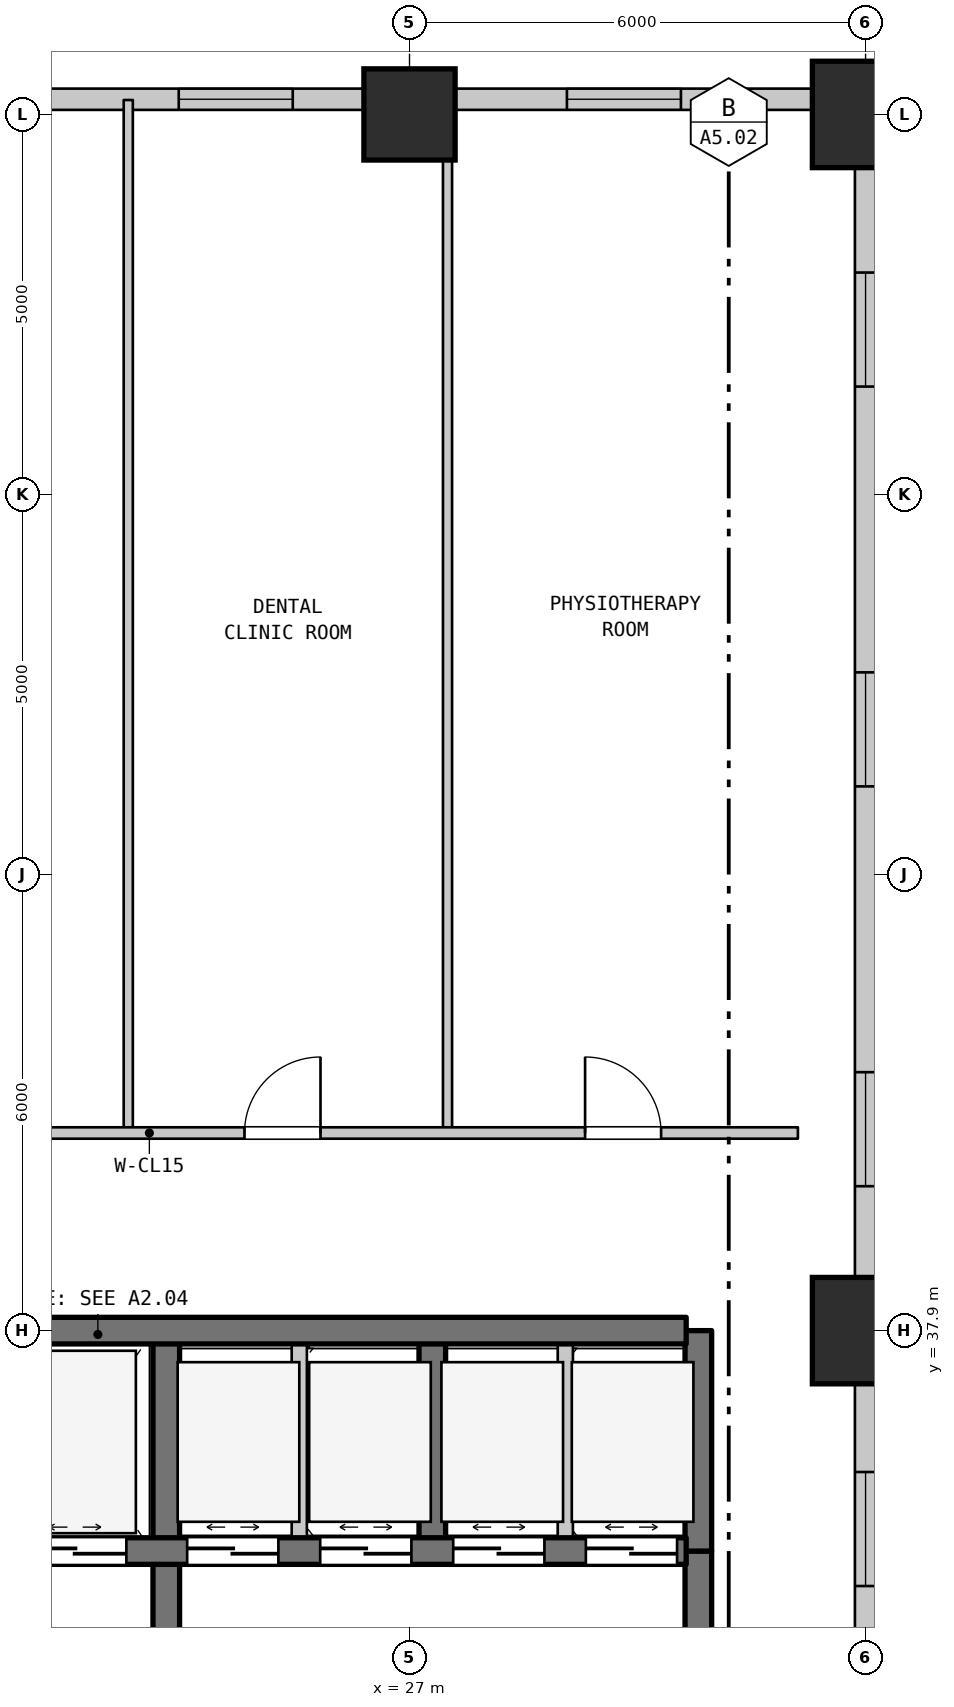
"""IFC4 building model, lengths in metres.
Left out: names, types, materials, properties, quantities, classifications, styles, units other than length and angle.
Written with IfcOpenShell. Run it as: python <this file> out.ifc"""

import sys

from ifc_helpers import new_model, si_unit, direction, frame, frame_2d, origin, origin_2d, place, context, subcontext, project, spatial, rectangle, extrude, element, fill, save


model = new_model("IFC4")
c1 = context("Model", 3, precision=1e-05, world=origin(), true_north=direction((0.0, 1.0)))
c2 = subcontext(c1, "Body", "Model", "MODEL_VIEW")
j1 = project(units=[si_unit("LENGTHUNIT", "METRE"), si_unit("PLANEANGLEUNIT", "RADIAN")], contexts=[c1])
p1 = place(None, origin())
s1 = spatial("IfcSite", under=j1, at=p1, CompositionType="ELEMENT")
p2 = place(p1, origin())
s2 = spatial("IfcBuilding", under=s1, at=p2, CompositionType="ELEMENT")
p3 = place(p2, frame((0.0, 0.0, 13.0)))
s3 = spatial("IfcBuildingStorey", under=s2, at=p3, CompositionType="ELEMENT", Elevation=13.0)
p4 = place(p3, frame((27.0, 53.9, 0.0), z_axis=(0.0, 0.0, 1.0), x_axis=(1.0, 0.0, 0.0)))
e1 = element("IfcColumn", 1, at=p4, inside=s3, PredefinedType="PILASTER", context=c2, shape_type="SweptSolid", body=[
    extrude(rectangle(XDim=1.2, YDim=1.2, at=origin_2d()), origin(), (0.0, 0.0, 1.0), 6.0),
])
for number, where, z_axis, x_axis in (
    (2, (33.0, 37.9, 0.0), (0.0, 0.0, 1.0), (1.0, 0.0, 0.0)),
    (3, (33.0, 53.9, 0.0), (0.0, 0.0, 1.0), (1.0, 0.0, 0.0)),
):
    element("IfcColumn", number, at=place(p3, frame(where, z_axis=z_axis, x_axis=x_axis)), inside=s3, PredefinedType="PILASTER", context=c2, shape_type="SweptSolid", body=[
        extrude(rectangle(XDim=1.4, YDim=1.4, at=origin_2d()), origin(), (0.0, 0.0, 1.0), 6.0),
    ])
p5 = place(p3, frame((4.414, 54.1, 0.0), z_axis=(0.0, 0.0, 1.0), x_axis=(1.0, 0.0, 0.0)))
e4 = element("IfcWall", 4, at=p5, inside=s3, PredefinedType="STANDARD", context=c2, shape_type="SweptSolid", body=[
    extrude(rectangle(XDim=28.586, YDim=0.28, at=frame_2d((14.293, 0.0))), origin(), (0.0, 0.0, 1.0), 5.58),
])
p6 = place(p5, frame((2.429, 0.0, 0.95)))
e5 = element("IfcOpeningElement", 5, at=p6, cuts=e4, PredefinedType="OPENING", context=c2, shape_type="SweptSolid", body=[
    extrude(rectangle(XDim=1.5, YDim=1.8, at=frame_2d((0.75, 0.9))), frame((0.0, 0.15, 0.0), z_axis=(0.0, -1.0, 0.0), x_axis=(1.0, 0.0, 0.0)), (0.0, 0.0, 1.0), 0.3),
])
p7 = place(p5, frame((7.986, 0.0, 0.95)))
e6 = element("IfcOpeningElement", 6, at=p7, cuts=e4, PredefinedType="OPENING", context=c2, shape_type="SweptSolid", body=[
    extrude(rectangle(XDim=1.5, YDim=1.8, at=frame_2d((0.75, 0.9))), frame((0.0, 0.15, 0.0), z_axis=(0.0, -1.0, 0.0), x_axis=(1.0, 0.0, 0.0)), (0.0, 0.0, 1.0), 0.3),
])
p8 = place(p5, frame((13.543, 0.0, 0.95)))
e7 = element("IfcOpeningElement", 7, at=p8, cuts=e4, PredefinedType="OPENING", context=c2, shape_type="SweptSolid", body=[
    extrude(rectangle(XDim=1.5, YDim=1.8, at=frame_2d((0.75, 0.9))), frame((0.0, 0.15, 0.0), z_axis=(0.0, -1.0, 0.0), x_axis=(1.0, 0.0, 0.0)), (0.0, 0.0, 1.0), 0.3),
])
p9 = place(p5, frame((19.55, 0.0, 0.95)))
e8 = element("IfcOpeningElement", 8, at=p9, cuts=e4, PredefinedType="OPENING", context=c2, shape_type="SweptSolid", body=[
    extrude(rectangle(XDim=1.5, YDim=1.8, at=frame_2d((0.75, 0.9))), frame((0.0, 0.15, 0.0), z_axis=(0.0, -1.0, 0.0), x_axis=(1.0, 0.0, 0.0)), (0.0, 0.0, 1.0), 0.3),
])
p10 = place(p5, frame((24.657, 0.0, 0.95)))
e9 = element("IfcOpeningElement", 9, at=p10, cuts=e4, PredefinedType="OPENING", context=c2, shape_type="SweptSolid", body=[
    extrude(rectangle(XDim=1.5, YDim=1.8, at=frame_2d((0.75, 0.9))), frame((0.0, 0.15, 0.0), z_axis=(0.0, -1.0, 0.0), x_axis=(1.0, 0.0, 0.0)), (0.0, 0.0, 1.0), 0.3),
])
p11 = place(p3, frame((33.0, 54.1, 0.0), z_axis=(0.0, 0.0, 1.0), x_axis=(0.0, -1.0, 0.0)))
e10 = element("IfcWall", 10, at=p11, inside=s3, PredefinedType="STANDARD", context=c2, shape_type="SweptSolid", body=[
    extrude(rectangle(XDim=16.2, YDim=0.28, at=frame_2d((8.1, 0.0))), origin(), (0.0, 0.0, 1.0), 4.98),
])
p12 = place(p11, frame((2.28, 0.0, 0.95)))
e11 = element("IfcOpeningElement", 11, at=p12, cuts=e10, PredefinedType="OPENING", context=c2, shape_type="SweptSolid", body=[
    extrude(rectangle(XDim=1.5, YDim=1.8, at=frame_2d((0.75, 0.9))), frame((0.0, 0.15, 0.0), z_axis=(0.0, -1.0, 0.0), x_axis=(1.0, 0.0, 0.0)), (0.0, 0.0, 1.0), 0.3),
])
p13 = place(p11, frame((7.54, 0.0, 0.95)))
e12 = element("IfcOpeningElement", 12, at=p13, cuts=e10, PredefinedType="OPENING", context=c2, shape_type="SweptSolid", body=[
    extrude(rectangle(XDim=1.5, YDim=1.8, at=frame_2d((0.75, 0.9))), frame((0.0, 0.15, 0.0), z_axis=(0.0, -1.0, 0.0), x_axis=(1.0, 0.0, 0.0)), (0.0, 0.0, 1.0), 0.3),
])
p14 = place(p11, frame((12.8, 0.0, 0.95)))
e13 = element("IfcOpeningElement", 13, at=p14, cuts=e10, PredefinedType="OPENING", context=c2, shape_type="SweptSolid", body=[
    extrude(rectangle(XDim=1.5, YDim=1.8, at=frame_2d((0.75, 0.9))), frame((0.0, 0.15, 0.0), z_axis=(0.0, -1.0, 0.0), x_axis=(1.0, 0.0, 0.0)), (0.0, 0.0, 1.0), 0.3),
])
p15 = place(p3, frame((23.3, 40.5, 0.0), z_axis=(0.0, 0.0, 1.0), x_axis=(0.0, 1.0, 0.0)))
e14 = element("IfcWall", 14, at=p15, inside=s3, PredefinedType="PARTITIONING", context=c2, shape_type="SweptSolid", body=[
    extrude(rectangle(XDim=13.59, YDim=0.12, at=frame_2d((6.795, 0.0))), origin(), (0.0, 0.0, 1.0), 5.58),
])
p16 = place(p3, frame((23.8, 31.5, 0.0), z_axis=(0.0, 0.0, 1.0), x_axis=(0.0, 1.0, 0.0)))
e15 = element("IfcWall", 15, at=p16, inside=s3, PredefinedType="SHEAR", context=c2, shape_type="SweptSolid", body=[
    extrude(rectangle(XDim=3.5, YDim=0.35, at=frame_2d((1.75, 0.0))), origin(), (0.0, 0.0, 1.0), 5.58),
])
p17 = place(p16, frame((1.127, 0.0, 0.0)))
e16 = element("IfcOpeningElement", 16, at=p17, cuts=e15, PredefinedType="OPENING", context=c2, shape_type="SweptSolid", body=[
    extrude(rectangle(XDim=1.1, YDim=2.15, at=frame_2d((0.55, 1.075))), frame((0.0, 0.185, 0.0), z_axis=(0.0, -1.0, 0.0), x_axis=(1.0, 0.0, 0.0)), (0.0, 0.0, 1.0), 0.37),
])
p18 = place(p3, frame((23.8, 35.0, 0.0), z_axis=(0.0, 0.0, 1.0), x_axis=(0.0, 1.0, 0.0)))
e17 = element("IfcWall", 17, at=p18, inside=s3, PredefinedType="SHEAR", context=c2, shape_type="SweptSolid", body=[
    extrude(rectangle(XDim=2.9, YDim=0.35, at=frame_2d((1.45, 0.0))), origin(), (0.0, 0.0, 1.0), 5.58),
])
p19 = place(p3, frame((25.55, 35.0, 0.0), z_axis=(0.0, 0.0, 1.0), x_axis=(0.0, 1.0, 0.0)))
e18 = element("IfcWall", 18, at=p19, inside=s3, PredefinedType="STANDARD", context=c2, shape_type="SweptSolid", body=[
    extrude(rectangle(XDim=2.9, YDim=0.2, at=frame_2d((1.45, 0.0))), origin(), (0.0, 0.0, 1.0), 5.58),
])
p20 = place(p3, frame((27.3, 35.0, 0.0), z_axis=(0.0, 0.0, 1.0), x_axis=(0.0, 1.0, 0.0)))
e19 = element("IfcWall", 19, at=p20, inside=s3, PredefinedType="SHEAR", context=c2, shape_type="SweptSolid", body=[
    extrude(rectangle(XDim=2.9, YDim=0.35, at=frame_2d((1.45, 0.0))), origin(), (0.0, 0.0, 1.0), 5.58),
])
p21 = place(p3, frame((27.5, 40.5, 0.0), z_axis=(0.0, 0.0, 1.0), x_axis=(0.0, 1.0, 0.0)))
e20 = element("IfcWall", 20, at=p21, inside=s3, PredefinedType="PARTITIONING", context=c2, shape_type="SweptSolid", body=[
    extrude(rectangle(XDim=13.59, YDim=0.12, at=frame_2d((6.795, 0.0))), origin(), (0.0, 0.0, 1.0), 5.58),
])
p22 = place(p3, frame((29.05, 35.0, 0.0), z_axis=(0.0, 0.0, 1.0), x_axis=(0.0, 1.0, 0.0)))
e21 = element("IfcWall", 21, at=p22, inside=s3, PredefinedType="STANDARD", context=c2, shape_type="SweptSolid", body=[
    extrude(rectangle(XDim=2.9, YDim=0.2, at=frame_2d((1.45, 0.0))), origin(), (0.0, 0.0, 1.0), 5.58),
])
p23 = place(p3, frame((30.8, 31.5, 0.0), z_axis=(0.0, 0.0, 1.0), x_axis=(0.0, 1.0, 0.0)))
e22 = element("IfcWall", 22, at=p23, inside=s3, PredefinedType="SHEAR", context=c2, shape_type="SweptSolid", body=[
    extrude(rectangle(XDim=3.5, YDim=0.35, at=frame_2d((1.75, 0.0))), origin(), (0.0, 0.0, 1.0), 5.58),
])
p24 = place(p23, frame((1.15, 0.0, 0.0)))
e23 = element("IfcOpeningElement", 23, at=p24, cuts=e22, PredefinedType="OPENING", context=c2, shape_type="SweptSolid", body=[
    extrude(rectangle(XDim=1.2, YDim=2.2, at=frame_2d((0.6, 1.1))), frame((0.0, 0.185, 0.0), z_axis=(0.0, -1.0, 0.0), x_axis=(1.0, 0.0, 0.0)), (0.0, 0.0, 1.0), 0.37),
])
p25 = place(p3, frame((30.8, 35.0, 0.0), z_axis=(0.0, 0.0, 1.0), x_axis=(0.0, 1.0, 0.0)))
e24 = element("IfcWall", 24, at=p25, inside=s3, PredefinedType="SHEAR", context=c2, shape_type="SweptSolid", body=[
    extrude(rectangle(XDim=2.9, YDim=0.35, at=frame_2d((1.45, 0.0))), origin(), (0.0, 0.0, 1.0), 5.58),
])
p26 = place(p3, frame((19.16, 35.0, 0.0), z_axis=(0.0, 0.0, 1.0), x_axis=(1.0, 0.0, 0.0)))
e25 = element("IfcWall", 25, at=p26, inside=s3, PredefinedType="SHEAR", context=c2, shape_type="SweptSolid", body=[
    extrude(rectangle(XDim=11.48, YDim=0.35, at=frame_2d((5.74, 0.0))), origin(), (0.0, 0.0, 1.0), 5.58),
])
p27 = place(p26, frame((0.365, 0.0, 0.0)))
e26 = element("IfcOpeningElement", 26, at=p27, cuts=e25, PredefinedType="OPENING", context=c2, shape_type="SweptSolid", body=[
    extrude(rectangle(XDim=1.35, YDim=2.2, at=frame_2d((0.675, 1.1))), frame((0.0, 0.185, 0.0), z_axis=(0.0, -1.0, 0.0), x_axis=(1.0, 0.0, 0.0)), (0.0, 0.0, 1.0), 0.37),
])
p28 = place(p26, frame((2.765, 0.0, 0.0)))
e27 = element("IfcOpeningElement", 27, at=p28, cuts=e25, PredefinedType="OPENING", context=c2, shape_type="SweptSolid", body=[
    extrude(rectangle(XDim=1.35, YDim=2.2, at=frame_2d((0.675, 1.1))), frame((0.0, 0.185, 0.0), z_axis=(0.0, -1.0, 0.0), x_axis=(1.0, 0.0, 0.0)), (0.0, 0.0, 1.0), 0.37),
])
p29 = place(p26, frame((4.915, 0.0, 0.0)))
e28 = element("IfcOpeningElement", 28, at=p29, cuts=e25, PredefinedType="OPENING", context=c2, shape_type="SweptSolid", body=[
    extrude(rectangle(XDim=1.2, YDim=2.2, at=frame_2d((0.6, 1.1))), frame((0.0, 0.185, 0.0), z_axis=(0.0, -1.0, 0.0), x_axis=(1.0, 0.0, 0.0)), (0.0, 0.0, 1.0), 0.37),
])
p30 = place(p26, frame((6.665, 0.0, 0.0)))
e29 = element("IfcOpeningElement", 29, at=p30, cuts=e25, PredefinedType="OPENING", context=c2, shape_type="SweptSolid", body=[
    extrude(rectangle(XDim=1.2, YDim=2.2, at=frame_2d((0.6, 1.1))), frame((0.0, 0.185, 0.0), z_axis=(0.0, -1.0, 0.0), x_axis=(1.0, 0.0, 0.0)), (0.0, 0.0, 1.0), 0.37),
])
p31 = place(p26, frame((8.415, 0.0, 0.0)))
e30 = element("IfcOpeningElement", 30, at=p31, cuts=e25, PredefinedType="OPENING", context=c2, shape_type="SweptSolid", body=[
    extrude(rectangle(XDim=1.2, YDim=2.2, at=frame_2d((0.6, 1.1))), frame((0.0, 0.185, 0.0), z_axis=(0.0, -1.0, 0.0), x_axis=(1.0, 0.0, 0.0)), (0.0, 0.0, 1.0), 0.37),
])
p32 = place(p26, frame((10.16, 0.0, 0.0)))
e31 = element("IfcOpeningElement", 31, at=p32, cuts=e25, PredefinedType="OPENING", context=c2, shape_type="SweptSolid", body=[
    extrude(rectangle(XDim=1.2, YDim=2.2, at=frame_2d((0.6, 1.1))), frame((0.0, 0.185, 0.0), z_axis=(0.0, -1.0, 0.0), x_axis=(1.0, 0.0, 0.0)), (0.0, 0.0, 1.0), 0.37),
])
p33 = place(p3, frame((19.16, 37.9, 0.0), z_axis=(0.0, 0.0, 1.0), x_axis=(1.0, 0.0, 0.0)))
e32 = element("IfcWall", 32, at=p33, inside=s3, PredefinedType="SHEAR", context=c2, shape_type="SweptSolid", body=[
    extrude(rectangle(XDim=11.48, YDim=0.35, at=frame_2d((5.74, 0.0))), origin(), (0.0, 0.0, 1.0), 5.58),
])
p34 = place(p3, frame((15.045, 40.5, 0.0), z_axis=(0.0, 0.0, 1.0), x_axis=(1.0, 0.0, 0.0)))
e33 = element("IfcWall", 33, at=p34, inside=s3, PredefinedType="STANDARD", context=c2, shape_type="SweptSolid", body=[
    extrude(rectangle(XDim=17.065, YDim=0.15, at=frame_2d((8.533, 0.0))), origin(), (0.0, 0.0, 1.0), 5.58),
])
p35 = place(p34, frame((3.705, 0.0, 0.0)))
e34 = element("IfcOpeningElement", 34, at=p35, cuts=e33, PredefinedType="OPENING", context=c2, shape_type="SweptSolid", body=[
    extrude(rectangle(XDim=1.0, YDim=2.15, at=frame_2d((0.5, 1.075))), frame((0.0, 0.085, 0.0), z_axis=(0.0, -1.0, 0.0), x_axis=(1.0, 0.0, 0.0)), (0.0, 0.0, 1.0), 0.17),
])
p36 = place(p34, frame((9.784, 0.0, 0.0)))
e35 = element("IfcOpeningElement", 35, at=p36, cuts=e33, PredefinedType="OPENING", context=c2, shape_type="SweptSolid", body=[
    extrude(rectangle(XDim=1.0, YDim=2.15, at=frame_2d((0.5, 1.075))), frame((0.0, 0.085, 0.0), z_axis=(0.0, -1.0, 0.0), x_axis=(1.0, 0.0, 0.0)), (0.0, 0.0, 1.0), 0.17),
])
p37 = place(p34, frame((14.265, 0.0, 0.0)))
e36 = element("IfcOpeningElement", 36, at=p37, cuts=e33, PredefinedType="OPENING", context=c2, shape_type="SweptSolid", body=[
    extrude(rectangle(XDim=1.0, YDim=2.15, at=frame_2d((0.5, 1.075))), frame((0.0, 0.085, 0.0), z_axis=(0.0, -1.0, 0.0), x_axis=(1.0, 0.0, 0.0)), (0.0, 0.0, 1.0), 0.17),
])
p38 = place(p3, frame((33.0, 37.9, 0.0), z_axis=(0.0, 0.0, 1.0), x_axis=(0.0, -1.0, 0.0)))
e37 = element("IfcWall", 37, at=p38, inside=s3, PredefinedType="STANDARD", context=c2, shape_type="SweptSolid", body=[
    extrude(rectangle(XDim=37.2, YDim=0.28, at=frame_2d((18.6, 0.0))), origin(), (0.0, 0.0, 1.0), 5.08),
])
p39 = place(p38, frame((1.86, 0.0, 0.95)))
e38 = element("IfcOpeningElement", 38, at=p39, cuts=e37, PredefinedType="OPENING", context=c2, shape_type="SweptSolid", body=[
    extrude(rectangle(XDim=1.5, YDim=1.8, at=frame_2d((0.75, 0.9))), frame((0.0, 0.15, 0.0), z_axis=(0.0, -1.0, 0.0), x_axis=(1.0, 0.0, 0.0)), (0.0, 0.0, 1.0), 0.3),
])
p40 = place(p38, frame((7.12, 0.0, 0.95)))
e39 = element("IfcOpeningElement", 39, at=p40, cuts=e37, PredefinedType="OPENING", context=c2, shape_type="SweptSolid", body=[
    extrude(rectangle(XDim=1.5, YDim=1.8, at=frame_2d((0.75, 0.9))), frame((0.0, 0.15, 0.0), z_axis=(0.0, -1.0, 0.0), x_axis=(1.0, 0.0, 0.0)), (0.0, 0.0, 1.0), 0.3),
])
p41 = place(p38, frame((12.38, 0.0, 0.95)))
e40 = element("IfcOpeningElement", 40, at=p41, cuts=e37, PredefinedType="OPENING", context=c2, shape_type="SweptSolid", body=[
    extrude(rectangle(XDim=1.5, YDim=1.8, at=frame_2d((0.75, 0.9))), frame((0.0, 0.15, 0.0), z_axis=(0.0, -1.0, 0.0), x_axis=(1.0, 0.0, 0.0)), (0.0, 0.0, 1.0), 0.3),
])
p42 = place(p38, frame((17.19, 0.0, 0.95)))
e41 = element("IfcOpeningElement", 41, at=p42, cuts=e37, PredefinedType="OPENING", context=c2, shape_type="SweptSolid", body=[
    extrude(rectangle(XDim=1.5, YDim=1.8, at=frame_2d((0.75, 0.9))), frame((0.0, 0.15, 0.0), z_axis=(0.0, -1.0, 0.0), x_axis=(1.0, 0.0, 0.0)), (0.0, 0.0, 1.0), 0.3),
])
p43 = place(p38, frame((22.45, 0.0, 0.95)))
e42 = element("IfcOpeningElement", 42, at=p43, cuts=e37, PredefinedType="OPENING", context=c2, shape_type="SweptSolid", body=[
    extrude(rectangle(XDim=1.5, YDim=1.8, at=frame_2d((0.75, 0.9))), frame((0.0, 0.15, 0.0), z_axis=(0.0, -1.0, 0.0), x_axis=(1.0, 0.0, 0.0)), (0.0, 0.0, 1.0), 0.3),
])
p44 = place(p38, frame((28.16, 0.0, 0.95)))
e43 = element("IfcOpeningElement", 43, at=p44, cuts=e37, PredefinedType="OPENING", context=c2, shape_type="SweptSolid", body=[
    extrude(rectangle(XDim=1.5, YDim=1.8, at=frame_2d((0.75, 0.9))), frame((0.0, 0.15, 0.0), z_axis=(0.0, -1.0, 0.0), x_axis=(1.0, 0.0, 0.0)), (0.0, 0.0, 1.0), 0.3),
])
p45 = place(p38, frame((33.42, 0.0, 0.95)))
e44 = element("IfcOpeningElement", 44, at=p45, cuts=e37, PredefinedType="OPENING", context=c2, shape_type="SweptSolid", body=[
    extrude(rectangle(XDim=1.5, YDim=1.8, at=frame_2d((0.75, 0.9))), frame((0.0, 0.15, 0.0), z_axis=(0.0, -1.0, 0.0), x_axis=(1.0, 0.0, 0.0)), (0.0, 0.0, 1.0), 0.3),
])
p46 = place(p9, origin())
e45 = element("IfcWindow", 45, at=p46, inside=s3, PartitioningType="SINGLE_PANEL", PredefinedType="WINDOW", context=c2, shape_type="SweptSolid", body=[
    extrude(rectangle(XDim=1.5, YDim=1.8, at=frame_2d((0.75, 0.9))), frame((0.0, 0.03, 0.0), z_axis=(0.0, -1.0, 0.0), x_axis=(1.0, 0.0, 0.0)), (0.0, 0.0, 1.0), 0.06),
])
fill(e8, e45)
p47 = place(p10, origin())
e46 = element("IfcWindow", 46, at=p47, inside=s3, PartitioningType="SINGLE_PANEL", PredefinedType="WINDOW", context=c2, shape_type="SweptSolid", body=[
    extrude(rectangle(XDim=1.5, YDim=1.8, at=frame_2d((0.75, 0.9))), frame((0.0, 0.03, 0.0), z_axis=(0.0, -1.0, 0.0), x_axis=(1.0, 0.0, 0.0)), (0.0, 0.0, 1.0), 0.06),
])
fill(e9, e46)
p48 = place(p12, origin())
e47 = element("IfcWindow", 47, at=p48, inside=s3, PartitioningType="SINGLE_PANEL", PredefinedType="WINDOW", context=c2, shape_type="SweptSolid", body=[
    extrude(rectangle(XDim=1.5, YDim=1.8, at=frame_2d((0.75, 0.9))), frame((0.0, 0.03, 0.0), z_axis=(0.0, -1.0, 0.0), x_axis=(1.0, 0.0, 0.0)), (0.0, 0.0, 1.0), 0.06),
])
fill(e11, e47)
p49 = place(p13, origin())
e48 = element("IfcWindow", 48, at=p49, inside=s3, PartitioningType="SINGLE_PANEL", PredefinedType="WINDOW", context=c2, shape_type="SweptSolid", body=[
    extrude(rectangle(XDim=1.5, YDim=1.8, at=frame_2d((0.75, 0.9))), frame((0.0, 0.03, 0.0), z_axis=(0.0, -1.0, 0.0), x_axis=(1.0, 0.0, 0.0)), (0.0, 0.0, 1.0), 0.06),
])
fill(e12, e48)
p50 = place(p14, origin())
e49 = element("IfcWindow", 49, at=p50, inside=s3, PartitioningType="SINGLE_PANEL", PredefinedType="WINDOW", context=c2, shape_type="SweptSolid", body=[
    extrude(rectangle(XDim=1.5, YDim=1.8, at=frame_2d((0.75, 0.9))), frame((0.0, 0.03, 0.0), z_axis=(0.0, -1.0, 0.0), x_axis=(1.0, 0.0, 0.0)), (0.0, 0.0, 1.0), 0.06),
])
fill(e13, e49)
p51 = place(p39, origin())
e50 = element("IfcWindow", 50, at=p51, inside=s3, PartitioningType="SINGLE_PANEL", PredefinedType="WINDOW", context=c2, shape_type="SweptSolid", body=[
    extrude(rectangle(XDim=1.5, YDim=1.8, at=frame_2d((0.75, 0.9))), frame((0.0, 0.03, 0.0), z_axis=(0.0, -1.0, 0.0), x_axis=(1.0, 0.0, 0.0)), (0.0, 0.0, 1.0), 0.06),
])
fill(e38, e50)
p52 = place(p28, origin())
e51 = element("IfcDoor", 51, at=p52, inside=s3, OperationType="DOUBLE_DOOR_SLIDING", PredefinedType="DOOR", context=c2, shape_type="SweptSolid", body=[
    extrude(rectangle(XDim=1.35, YDim=2.2, at=frame_2d((0.675, 1.1))), frame((0.0, 0.025, 0.0), z_axis=(0.0, -1.0, 0.0), x_axis=(1.0, 0.0, 0.0)), (0.0, 0.0, 1.0), 0.05),
])
fill(e27, e51)
p53 = place(p29, origin())
e52 = element("IfcDoor", 52, at=p53, inside=s3, OperationType="DOUBLE_DOOR_SLIDING", PredefinedType="DOOR", context=c2, shape_type="SweptSolid", body=[
    extrude(rectangle(XDim=1.2, YDim=2.2, at=frame_2d((0.6, 1.1))), frame((0.0, 0.025, 0.0), z_axis=(0.0, -1.0, 0.0), x_axis=(1.0, 0.0, 0.0)), (0.0, 0.0, 1.0), 0.05),
])
fill(e28, e52)
p54 = place(p30, origin())
e53 = element("IfcDoor", 53, at=p54, inside=s3, OperationType="DOUBLE_DOOR_SLIDING", PredefinedType="DOOR", context=c2, shape_type="SweptSolid", body=[
    extrude(rectangle(XDim=1.2, YDim=2.2, at=frame_2d((0.6, 1.1))), frame((0.0, 0.025, 0.0), z_axis=(0.0, -1.0, 0.0), x_axis=(1.0, 0.0, 0.0)), (0.0, 0.0, 1.0), 0.05),
])
fill(e29, e53)
p55 = place(p31, origin())
e54 = element("IfcDoor", 54, at=p55, inside=s3, OperationType="DOUBLE_DOOR_SLIDING", PredefinedType="DOOR", context=c2, shape_type="SweptSolid", body=[
    extrude(rectangle(XDim=1.2, YDim=2.2, at=frame_2d((0.6, 1.1))), frame((0.0, 0.025, 0.0), z_axis=(0.0, -1.0, 0.0), x_axis=(1.0, 0.0, 0.0)), (0.0, 0.0, 1.0), 0.05),
])
fill(e30, e54)
p56 = place(p32, origin())
e55 = element("IfcDoor", 55, at=p56, inside=s3, OperationType="DOUBLE_DOOR_SLIDING", PredefinedType="DOOR", context=c2, shape_type="SweptSolid", body=[
    extrude(rectangle(XDim=1.2, YDim=2.2, at=frame_2d((0.6, 1.1))), frame((0.0, 0.025, 0.0), z_axis=(0.0, -1.0, 0.0), x_axis=(1.0, 0.0, 0.0)), (0.0, 0.0, 1.0), 0.05),
])
fill(e31, e55)
p57 = place(p36, origin())
e56 = element("IfcDoor", 56, at=p57, inside=s3, OperationType="SINGLE_SWING_RIGHT", PredefinedType="DOOR", context=c2, shape_type="SweptSolid", body=[
    extrude(rectangle(XDim=1.0, YDim=2.15, at=frame_2d((0.5, 1.075))), frame((0.0, 0.025, 0.0), z_axis=(0.0, -1.0, 0.0), x_axis=(1.0, 0.0, 0.0)), (0.0, 0.0, 1.0), 0.05),
])
fill(e35, e56)
p58 = place(p37, origin())
e57 = element("IfcDoor", 57, at=p58, inside=s3, OperationType="SINGLE_SWING_LEFT", PredefinedType="DOOR", context=c2, shape_type="SweptSolid", body=[
    extrude(rectangle(XDim=1.0, YDim=2.15, at=frame_2d((0.5, 1.075))), frame((0.0, 0.025, 0.0), z_axis=(0.0, -1.0, 0.0), x_axis=(1.0, 0.0, 0.0)), (0.0, 0.0, 1.0), 0.05),
])
fill(e36, e57)
save(model, sys.argv[1])
